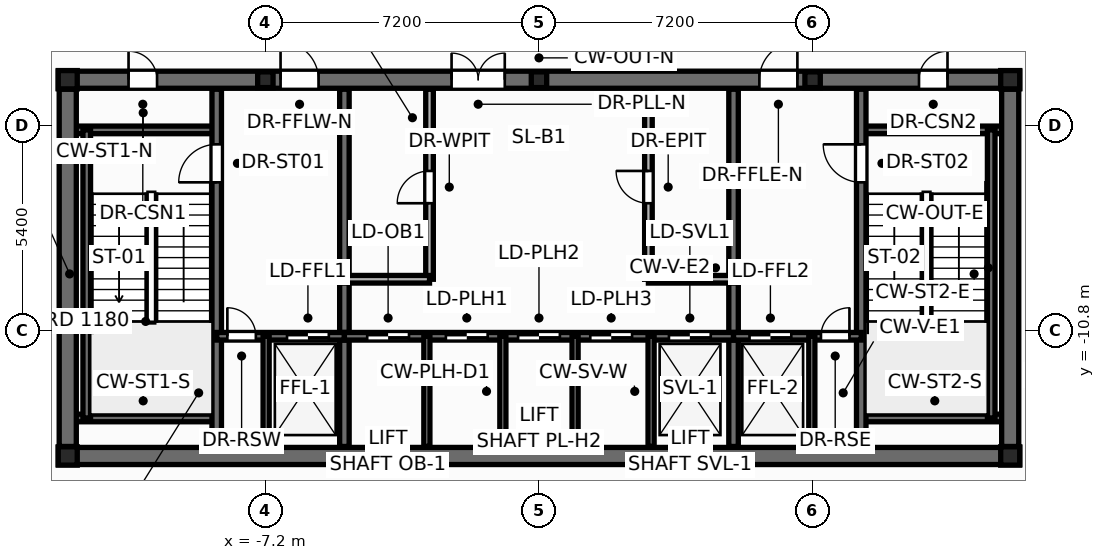
"""IFC4 building model, lengths in metres.
Left out: names, types, materials, properties, quantities, classifications, styles, units other than length and angle.
Written with IfcOpenShell. Run it as: python <this file> out.ifc"""

import sys

from ifc_helpers import new_model, si_unit, direction, frame, frame_2d, origin, origin_2d, place, context, subcontext, project, spatial, rectangle, i_section, extrude, element, fill, save


model = new_model("IFC4")
c1 = context("Model", 3, precision=1e-05, world=origin(), true_north=direction((0.0, 1.0)))
c2 = subcontext(c1, "Body", "Model", "MODEL_VIEW")
j1 = project(units=[si_unit("LENGTHUNIT", "METRE"), si_unit("PLANEANGLEUNIT", "RADIAN")], contexts=[c1])
p1 = place(None, origin())
s1 = spatial("IfcSite", under=j1, at=p1, CompositionType="ELEMENT")
p2 = place(p1, origin())
s2 = spatial("IfcBuilding", under=s1, at=p2, CompositionType="ELEMENT")
p3 = place(p2, frame((0.0, 0.0, -4.8)))
s3 = spatial("IfcBuildingStorey", under=s2, at=p3, CompositionType="ELEMENT", Elevation=-4.8)
for number, where, z_axis, x_axis in (
    (1, (-12.4, -14.1, 0.0), (0.0, 0.0, 1.0), (1.0, 0.0, 0.0)),
    (2, (12.4, -14.1, 0.0), (0.0, 0.0, 1.0), (1.0, 0.0, 0.0)),
    (3, (12.4, -4.2, 0.0), (0.0, 0.0, 1.0), (1.0, 0.0, 0.0)),
    (4, (-12.4, -4.2, 0.0), (0.0, 0.0, 1.0), (1.0, 0.0, 0.0)),
):
    element("IfcColumn", number, at=place(p3, frame(where, z_axis=z_axis, x_axis=x_axis)), inside=s3, PredefinedType="COLUMN", context=c2, shape_type="SweptSolid", body=[
        extrude(i_section(OverallWidth=0.5, OverallDepth=0.482, WebThickness=0.04, FlangeThickness=0.045, at=origin_2d()), origin(), (0.0, 0.0, 1.0), 4.8),
    ])
for number, where, z_axis, x_axis in (
    (5, (-7.2, -4.2, 0.0), (0.0, 0.0, 1.0), (1.0, 0.0, 0.0)),
    (6, (0.0, -4.2, 0.0), (0.0, 0.0, 1.0), (1.0, 0.0, 0.0)),
    (7, (7.2, -4.2, 0.0), (0.0, 0.0, 1.0), (1.0, 0.0, 0.0)),
):
    element("IfcColumn", number, at=place(p3, frame(where, z_axis=z_axis, x_axis=x_axis)), inside=s3, PredefinedType="PILASTER", context=c2, shape_type="SweptSolid", body=[
        extrude(i_section(OverallWidth=0.405, OverallDepth=0.414, WebThickness=0.022, FlangeThickness=0.032, at=origin_2d()), origin(), (0.0, 0.0, 1.0), 4.8),
    ])
p4 = place(p3, frame((-12.65, -14.1, 0.0), z_axis=(0.0, 0.0, 1.0), x_axis=(1.0, 0.0, 0.0)))
e8 = element("IfcWall", 8, at=p4, inside=s3, PredefinedType="SHEAR", context=c2, shape_type="SweptSolid", body=[
    extrude(rectangle(XDim=25.3, YDim=0.45, at=frame_2d((12.65, 0.0))), origin(), (0.0, 0.0, 1.0), 4.8),
])
p5 = place(p3, frame((-12.65, -4.2, 0.0), z_axis=(0.0, 0.0, 1.0), x_axis=(1.0, 0.0, 0.0)))
e9 = element("IfcWall", 9, at=p5, inside=s3, PredefinedType="SHEAR", context=c2, shape_type="SweptSolid", body=[
    extrude(rectangle(XDim=25.3, YDim=0.45, at=frame_2d((12.65, 0.0))), origin(), (0.0, 0.0, 1.0), 4.8),
])
p6 = place(p5, frame((1.85, 0.0, 0.0)))
e10 = element("IfcOpeningElement", 10, at=p6, cuts=e9, PredefinedType="OPENING", context=c2, shape_type="SweptSolid", body=[
    extrude(rectangle(XDim=0.756, YDim=2.054, at=frame_2d((0.375, 1.027))), frame((0.0, 0.235, 0.0), z_axis=(0.0, -1.0, 0.0), x_axis=(1.0, 0.0, 0.0)), (0.0, 0.0, 1.0), 0.47),
])
p7 = place(p5, frame((22.65, 0.0, 0.0)))
e11 = element("IfcOpeningElement", 11, at=p7, cuts=e9, PredefinedType="OPENING", context=c2, shape_type="SweptSolid", body=[
    extrude(rectangle(XDim=0.756, YDim=2.054, at=frame_2d((0.375, 1.027))), frame((0.0, 0.235, 0.0), z_axis=(0.0, -1.0, 0.0), x_axis=(1.0, 0.0, 0.0)), (0.0, 0.0, 1.0), 0.47),
])
p8 = place(p5, frame((5.85, 0.0, 0.0)))
e12 = element("IfcOpeningElement", 12, at=p8, cuts=e9, PredefinedType="OPENING", context=c2, shape_type="SweptSolid", body=[
    extrude(rectangle(XDim=1.006, YDim=2.104, at=frame_2d((0.5, 1.052))), frame((0.0, 0.235, 0.0), z_axis=(0.0, -1.0, 0.0), x_axis=(1.0, 0.0, 0.0)), (0.0, 0.0, 1.0), 0.47),
])
p9 = place(p5, frame((10.35, 0.0, 0.0)))
e13 = element("IfcOpeningElement", 13, at=p9, cuts=e9, PredefinedType="OPENING", context=c2, shape_type="SweptSolid", body=[
    extrude(rectangle(XDim=1.406, YDim=2.154, at=frame_2d((0.7, 1.077))), frame((0.0, 0.235, 0.0), z_axis=(0.0, -1.0, 0.0), x_axis=(1.0, 0.0, 0.0)), (0.0, 0.0, 1.0), 0.47),
])
p10 = place(p5, frame((18.45, 0.0, 0.0)))
e14 = element("IfcOpeningElement", 14, at=p10, cuts=e9, PredefinedType="OPENING", context=c2, shape_type="SweptSolid", body=[
    extrude(rectangle(XDim=1.006, YDim=2.104, at=frame_2d((0.5, 1.052))), frame((0.0, 0.235, 0.0), z_axis=(0.0, -1.0, 0.0), x_axis=(1.0, 0.0, 0.0)), (0.0, 0.0, 1.0), 0.47),
])
for number, where, z_axis, x_axis in (
    (15, (-12.35, -5.52, 0.0), (0.0, 0.0, 1.0), (1.0, 0.0, 0.0)),
    (16, (-12.35, -13.1, 0.0), (0.0, 0.0, 1.0), (1.0, 0.0, 0.0)),
):
    element("IfcWall", number, at=place(p3, frame(where, z_axis=z_axis, x_axis=x_axis)), inside=s3, PredefinedType="SOLIDWALL", context=c2, shape_type="SweptSolid", body=[
        extrude(rectangle(XDim=3.87, YDim=0.2, at=frame_2d((1.935, 0.0))), origin(), (0.0, 0.0, 1.0), 4.8),
    ])
p11 = place(p3, frame((-11.9, -13.1, 0.0), z_axis=(0.0, 0.0, 1.0), x_axis=(0.0, 1.0, 0.0)))
e17 = element("IfcWall", 17, at=p11, inside=s3, PredefinedType="SOLIDWALL", context=c2, shape_type="SweptSolid", body=[
    extrude(rectangle(XDim=7.58, YDim=0.2, at=frame_2d((3.79, 0.0))), origin(), (0.0, 0.0, 1.0), 4.8),
])
for number, where, z_axis, x_axis in (
    (18, (8.48, -5.52, 0.0), (0.0, 0.0, 1.0), (1.0, 0.0, 0.0)),
    (19, (8.48, -13.1, 0.0), (0.0, 0.0, 1.0), (1.0, 0.0, 0.0)),
):
    element("IfcWall", number, at=place(p3, frame(where, z_axis=z_axis, x_axis=x_axis)), inside=s3, PredefinedType="SOLIDWALL", context=c2, shape_type="SweptSolid", body=[
        extrude(rectangle(XDim=3.87, YDim=0.2, at=frame_2d((1.935, 0.0))), origin(), (0.0, 0.0, 1.0), 4.8),
    ])
p12 = place(p3, frame((11.9, -13.1, 0.0), z_axis=(0.0, 0.0, 1.0), x_axis=(0.0, 1.0, 0.0)))
e20 = element("IfcWall", 20, at=p12, inside=s3, PredefinedType="SOLIDWALL", context=c2, shape_type="SweptSolid", body=[
    extrude(rectangle(XDim=7.58, YDim=0.2, at=frame_2d((3.79, 0.0))), origin(), (0.0, 0.0, 1.0), 4.8),
])
p13 = place(p3, frame((-8.48, -13.85, 0.0), z_axis=(0.0, 0.0, 1.0), x_axis=(0.0, 1.0, 0.0)))
e21 = element("IfcWall", 21, at=p13, inside=s3, PredefinedType="SHEAR", context=c2, shape_type="SweptSolid", body=[
    extrude(rectangle(XDim=9.4, YDim=0.25, at=frame_2d((4.7, 0.0))), origin(), (0.0, 0.0, 1.0), 4.8),
])
p14 = place(p13, frame((6.95, 0.0, 0.0)))
e22 = element("IfcOpeningElement", 22, at=p14, cuts=e21, PredefinedType="OPENING", context=c2, shape_type="SweptSolid", body=[
    extrude(rectangle(XDim=1.006, YDim=2.104, at=frame_2d((0.5, 1.052))), frame((0.0, 0.135, 0.0), z_axis=(0.0, -1.0, 0.0), x_axis=(1.0, 0.0, 0.0)), (0.0, 0.0, 1.0), 0.27),
])
p15 = place(p3, frame((8.48, -13.85, 0.0), z_axis=(0.0, 0.0, 1.0), x_axis=(0.0, 1.0, 0.0)))
e23 = element("IfcWall", 23, at=p15, inside=s3, PredefinedType="SHEAR", context=c2, shape_type="SweptSolid", body=[
    extrude(rectangle(XDim=9.4, YDim=0.25, at=frame_2d((4.7, 0.0))), origin(), (0.0, 0.0, 1.0), 4.8),
])
p16 = place(p15, frame((6.95, 0.0, 0.0)))
e24 = element("IfcOpeningElement", 24, at=p16, cuts=e23, PredefinedType="OPENING", context=c2, shape_type="SweptSolid", body=[
    extrude(rectangle(XDim=1.006, YDim=2.104, at=frame_2d((0.5, 1.052))), frame((0.0, 0.135, 0.0), z_axis=(0.0, -1.0, 0.0), x_axis=(1.0, 0.0, 0.0)), (0.0, 0.0, 1.0), 0.27),
])
for number, where, z_axis, x_axis in (
    (25, (-5.12, -13.85, 0.0), (0.0, 0.0, 1.0), (0.0, 1.0, 0.0)),
    (26, (5.12, -13.85, 0.0), (0.0, 0.0, 1.0), (0.0, 1.0, 0.0)),
):
    element("IfcWall", number, at=place(p3, frame(where, z_axis=z_axis, x_axis=x_axis)), inside=s3, PredefinedType="SHEAR", context=c2, shape_type="SweptSolid", body=[
        extrude(rectangle(XDim=9.4, YDim=0.25, at=frame_2d((4.7, 0.0))), origin(), (0.0, 0.0, 1.0), 4.8),
    ])
p17 = place(p3, frame((-8.48, -10.95, 0.0), z_axis=(0.0, 0.0, 1.0), x_axis=(1.0, 0.0, 0.0)))
e27 = element("IfcWall", 27, at=p17, inside=s3, PredefinedType="SOLIDWALL", context=c2, shape_type="SweptSolid", body=[
    extrude(rectangle(XDim=3.36, YDim=0.2, at=frame_2d((1.68, 0.0))), origin(), (0.0, 0.0, 1.0), 4.8),
])
p18 = place(p17, frame((0.28, 0.0, 0.0)))
e28 = element("IfcOpeningElement", 28, at=p18, cuts=e27, PredefinedType="OPENING", context=c2, shape_type="SweptSolid", body=[
    extrude(rectangle(XDim=0.756, YDim=2.054, at=frame_2d((0.375, 1.027))), frame((0.0, 0.11, 0.0), z_axis=(0.0, -1.0, 0.0), x_axis=(1.0, 0.0, 0.0)), (0.0, 0.0, 1.0), 0.22),
])
p19 = place(p17, frame((1.85, 0.0, 0.0)))
e29 = element("IfcOpeningElement", 29, at=p19, cuts=e27, PredefinedType="OPENING", context=c2, shape_type="SweptSolid", body=[
    extrude(rectangle(XDim=1.106, YDim=2.104, at=frame_2d((0.55, 1.052))), frame((0.0, 0.11, 0.0), z_axis=(0.0, -1.0, 0.0), x_axis=(1.0, 0.0, 0.0)), (0.0, 0.0, 1.0), 0.22),
])
p20 = place(p3, frame((-5.12, -10.95, 0.0), z_axis=(0.0, 0.0, 1.0), x_axis=(1.0, 0.0, 0.0)))
e30 = element("IfcWall", 30, at=p20, inside=s3, PredefinedType="SOLIDWALL", context=c2, shape_type="SweptSolid", body=[
    extrude(rectangle(XDim=10.24, YDim=0.2, at=frame_2d((5.12, 0.0))), origin(), (0.0, 0.0, 1.0), 4.8),
])
p21 = place(p20, frame((0.6, 0.0, 0.0)))
e31 = element("IfcOpeningElement", 31, at=p21, cuts=e30, PredefinedType="OPENING", context=c2, shape_type="SweptSolid", body=[
    extrude(rectangle(XDim=1.106, YDim=2.104, at=frame_2d((0.55, 1.052))), frame((0.0, 0.11, 0.0), z_axis=(0.0, -1.0, 0.0), x_axis=(1.0, 0.0, 0.0)), (0.0, 0.0, 1.0), 0.22),
])
p22 = place(p20, frame((2.67, 0.0, 0.0)))
e32 = element("IfcOpeningElement", 32, at=p22, cuts=e30, PredefinedType="OPENING", context=c2, shape_type="SweptSolid", body=[
    extrude(rectangle(XDim=1.106, YDim=2.104, at=frame_2d((0.55, 1.052))), frame((0.0, 0.11, 0.0), z_axis=(0.0, -1.0, 0.0), x_axis=(1.0, 0.0, 0.0)), (0.0, 0.0, 1.0), 0.22),
])
p23 = place(p20, frame((4.57, 0.0, 0.0)))
e33 = element("IfcOpeningElement", 33, at=p23, cuts=e30, PredefinedType="OPENING", context=c2, shape_type="SweptSolid", body=[
    extrude(rectangle(XDim=1.106, YDim=2.104, at=frame_2d((0.55, 1.052))), frame((0.0, 0.11, 0.0), z_axis=(0.0, -1.0, 0.0), x_axis=(1.0, 0.0, 0.0)), (0.0, 0.0, 1.0), 0.22),
])
p24 = place(p20, frame((6.47, 0.0, 0.0)))
e34 = element("IfcOpeningElement", 34, at=p24, cuts=e30, PredefinedType="OPENING", context=c2, shape_type="SweptSolid", body=[
    extrude(rectangle(XDim=1.106, YDim=2.104, at=frame_2d((0.55, 1.052))), frame((0.0, 0.11, 0.0), z_axis=(0.0, -1.0, 0.0), x_axis=(1.0, 0.0, 0.0)), (0.0, 0.0, 1.0), 0.22),
])
p25 = place(p20, frame((8.54, 0.0, 0.0)))
e35 = element("IfcOpeningElement", 35, at=p25, cuts=e30, PredefinedType="OPENING", context=c2, shape_type="SweptSolid", body=[
    extrude(rectangle(XDim=1.106, YDim=2.104, at=frame_2d((0.55, 1.052))), frame((0.0, 0.11, 0.0), z_axis=(0.0, -1.0, 0.0), x_axis=(1.0, 0.0, 0.0)), (0.0, 0.0, 1.0), 0.22),
])
p26 = place(p3, frame((5.12, -10.95, 0.0), z_axis=(0.0, 0.0, 1.0), x_axis=(1.0, 0.0, 0.0)))
e36 = element("IfcWall", 36, at=p26, inside=s3, PredefinedType="SOLIDWALL", context=c2, shape_type="SweptSolid", body=[
    extrude(rectangle(XDim=3.36, YDim=0.2, at=frame_2d((1.68, 0.0))), origin(), (0.0, 0.0, 1.0), 4.8),
])
p27 = place(p26, frame((0.42, 0.0, 0.0)))
e37 = element("IfcOpeningElement", 37, at=p27, cuts=e36, PredefinedType="OPENING", context=c2, shape_type="SweptSolid", body=[
    extrude(rectangle(XDim=1.106, YDim=2.104, at=frame_2d((0.55, 1.052))), frame((0.0, 0.11, 0.0), z_axis=(0.0, -1.0, 0.0), x_axis=(1.0, 0.0, 0.0)), (0.0, 0.0, 1.0), 0.22),
])
p28 = place(p26, frame((2.3, 0.0, 0.0)))
e38 = element("IfcOpeningElement", 38, at=p28, cuts=e36, PredefinedType="OPENING", context=c2, shape_type="SweptSolid", body=[
    extrude(rectangle(XDim=0.756, YDim=2.054, at=frame_2d((0.375, 1.027))), frame((0.0, 0.11, 0.0), z_axis=(0.0, -1.0, 0.0), x_axis=(1.0, 0.0, 0.0)), (0.0, 0.0, 1.0), 0.22),
])
for number, where, z_axis, x_axis in (
    (39, (-7.18, -13.85, 0.0), (0.0, 0.0, 1.0), (0.0, 1.0, 0.0)),
    (40, (7.18, -13.85, 0.0), (0.0, 0.0, 1.0), (0.0, 1.0, 0.0)),
    (41, (-2.95, -13.85, 0.0), (0.0, 0.0, 1.0), (0.0, 1.0, 0.0)),
    (42, (2.95, -13.85, 0.0), (0.0, 0.0, 1.0), (0.0, 1.0, 0.0)),
):
    element("IfcWall", number, at=place(p3, frame(where, z_axis=z_axis, x_axis=x_axis)), inside=s3, PredefinedType="PARTITIONING", context=c2, shape_type="SweptSolid", body=[
        extrude(rectangle(XDim=2.9, YDim=0.16, at=frame_2d((1.45, 0.0))), origin(), (0.0, 0.0, 1.0), 3.505),
    ])
for number, where, z_axis, x_axis in (
    (43, (-12.4, -13.85, 0.0), (0.0, 0.0, 1.0), (0.0, 1.0, 0.0)),
    (44, (12.4, -13.85, 0.0), (0.0, 0.0, 1.0), (0.0, 1.0, 0.0)),
):
    element("IfcWall", number, at=place(p3, frame(where, z_axis=z_axis, x_axis=x_axis)), inside=s3, PredefinedType="SHEAR", context=c2, shape_type="SweptSolid", body=[
        extrude(rectangle(XDim=9.4, YDim=0.45, at=frame_2d((4.7, 0.0))), origin(), (0.0, 0.0, 1.0), 4.8),
    ])
p29 = place(p3, frame((-2.88, -9.45, 0.0), z_axis=(0.0, 0.0, 1.0), x_axis=(0.0, 1.0, 0.0)))
e45 = element("IfcWall", 45, at=p29, inside=s3, PredefinedType="SOLIDWALL", context=c2, shape_type="SweptSolid", body=[
    extrude(rectangle(XDim=5.0, YDim=0.2, at=frame_2d((2.5, 0.0))), origin(), (0.0, 0.0, 1.0), 4.48),
])
p30 = place(p29, frame((2.0, 0.0, 0.0)))
e46 = element("IfcOpeningElement", 46, at=p30, cuts=e45, PredefinedType="OPENING", context=c2, shape_type="SweptSolid", body=[
    extrude(rectangle(XDim=0.856, YDim=2.054, at=frame_2d((0.425, 1.027))), frame((0.0, 0.11, 0.0), z_axis=(0.0, -1.0, 0.0), x_axis=(1.0, 0.0, 0.0)), (0.0, 0.0, 1.0), 0.22),
])
p31 = place(p3, frame((-5.12, -9.45, 0.0), z_axis=(0.0, 0.0, 1.0), x_axis=(1.0, 0.0, 0.0)))
e47 = element("IfcWall", 47, at=p31, inside=s3, PredefinedType="SOLIDWALL", context=c2, shape_type="SweptSolid", body=[
    extrude(rectangle(XDim=2.24, YDim=0.2, at=frame_2d((1.12, 0.0))), origin(), (0.0, 0.0, 1.0), 4.48),
])
p32 = place(p3, frame((2.88, -9.45, 0.0), z_axis=(0.0, 0.0, 1.0), x_axis=(0.0, 1.0, 0.0)))
e48 = element("IfcWall", 48, at=p32, inside=s3, PredefinedType="SOLIDWALL", context=c2, shape_type="SweptSolid", body=[
    extrude(rectangle(XDim=5.0, YDim=0.2, at=frame_2d((2.5, 0.0))), origin(), (0.0, 0.0, 1.0), 4.48),
])
p33 = place(p32, frame((2.0, 0.0, 0.0)))
e49 = element("IfcOpeningElement", 49, at=p33, cuts=e48, PredefinedType="OPENING", context=c2, shape_type="SweptSolid", body=[
    extrude(rectangle(XDim=0.856, YDim=2.054, at=frame_2d((0.425, 1.027))), frame((0.0, 0.11, 0.0), z_axis=(0.0, -1.0, 0.0), x_axis=(1.0, 0.0, 0.0)), (0.0, 0.0, 1.0), 0.22),
])
p34 = place(p3, frame((2.88, -9.45, 0.0), z_axis=(0.0, 0.0, 1.0), x_axis=(1.0, 0.0, 0.0)))
e50 = element("IfcWall", 50, at=p34, inside=s3, PredefinedType="SOLIDWALL", context=c2, shape_type="SweptSolid", body=[
    extrude(rectangle(XDim=2.24, YDim=0.2, at=frame_2d((1.12, 0.0))), origin(), (0.0, 0.0, 1.0), 4.48),
])
for number, where, z_axis, x_axis in (
    (51, (-0.95, -13.85, 0.0), (0.0, 0.0, 1.0), (0.0, 1.0, 0.0)),
    (52, (0.95, -13.85, 0.0), (0.0, 0.0, 1.0), (0.0, 1.0, 0.0)),
):
    element("IfcWall", number, at=place(p3, frame(where, z_axis=z_axis, x_axis=x_axis)), inside=s3, PredefinedType="PARTITIONING", context=c2, shape_type="SweptSolid", body=[
        extrude(rectangle(XDim=2.9, YDim=0.16, at=frame_2d((1.45, 0.0))), origin(), (0.0, 0.0, 1.0), 3.505),
    ])
p35 = place(p30, origin())
e53 = element("IfcDoor", 53, at=p35, inside=s3, OperationType="SINGLE_SWING_LEFT", PredefinedType="DOOR", context=c2, shape_type="SweptSolid", body=[
    extrude(rectangle(XDim=0.85, YDim=2.05, at=frame_2d((0.425, 1.025))), frame((0.0, 0.025, 0.0), z_axis=(0.0, -1.0, 0.0), x_axis=(1.0, 0.0, 0.0)), (0.0, 0.0, 1.0), 0.05),
])
fill(e46, e53)
p36 = place(p33, origin())
e54 = element("IfcDoor", 54, at=p36, inside=s3, OperationType="SINGLE_SWING_RIGHT", PredefinedType="DOOR", context=c2, shape_type="SweptSolid", body=[
    extrude(rectangle(XDim=0.85, YDim=2.05, at=frame_2d((0.425, 1.025))), frame((0.0, 0.025, 0.0), z_axis=(0.0, -1.0, 0.0), x_axis=(1.0, 0.0, 0.0)), (0.0, 0.0, 1.0), 0.05),
])
fill(e49, e54)
p37 = place(p14, origin())
e55 = element("IfcDoor", 55, at=p37, inside=s3, OperationType="SINGLE_SWING_LEFT", PredefinedType="DOOR", context=c2, shape_type="SweptSolid", body=[
    extrude(rectangle(XDim=1.0, YDim=2.1, at=frame_2d((0.5, 1.05))), frame((0.0, 0.025, 0.0), z_axis=(0.0, -1.0, 0.0), x_axis=(1.0, 0.0, 0.0)), (0.0, 0.0, 1.0), 0.05),
])
fill(e22, e55)
p38 = place(p16, origin())
e56 = element("IfcDoor", 56, at=p38, inside=s3, OperationType="SINGLE_SWING_RIGHT", PredefinedType="DOOR", context=c2, shape_type="SweptSolid", body=[
    extrude(rectangle(XDim=1.0, YDim=2.1, at=frame_2d((0.5, 1.05))), frame((0.0, 0.025, 0.0), z_axis=(0.0, -1.0, 0.0), x_axis=(1.0, 0.0, 0.0)), (0.0, 0.0, 1.0), 0.05),
])
fill(e24, e56)
p39 = place(p18, origin())
e57 = element("IfcDoor", 57, at=p39, inside=s3, OperationType="SINGLE_SWING_LEFT", PredefinedType="DOOR", context=c2, shape_type="SweptSolid", body=[
    extrude(rectangle(XDim=0.75, YDim=2.05, at=frame_2d((0.375, 1.025))), frame((0.0, 0.025, 0.0), z_axis=(0.0, -1.0, 0.0), x_axis=(1.0, 0.0, 0.0)), (0.0, 0.0, 1.0), 0.05),
])
fill(e28, e57)
p40 = place(p19, origin())
e58 = element("IfcDoor", 58, at=p40, inside=s3, OperationType="DOUBLE_DOOR_SLIDING", PredefinedType="DOOR", context=c2, shape_type="SweptSolid", body=[
    extrude(rectangle(XDim=1.1, YDim=2.1, at=frame_2d((0.55, 1.05))), frame((0.0, 0.025, 0.0), z_axis=(0.0, -1.0, 0.0), x_axis=(1.0, 0.0, 0.0)), (0.0, 0.0, 1.0), 0.05),
])
fill(e29, e58)
p41 = place(p27, origin())
e59 = element("IfcDoor", 59, at=p41, inside=s3, OperationType="DOUBLE_DOOR_SLIDING", PredefinedType="DOOR", context=c2, shape_type="SweptSolid", body=[
    extrude(rectangle(XDim=1.1, YDim=2.1, at=frame_2d((0.55, 1.05))), frame((0.0, 0.025, 0.0), z_axis=(0.0, -1.0, 0.0), x_axis=(1.0, 0.0, 0.0)), (0.0, 0.0, 1.0), 0.05),
])
fill(e37, e59)
p42 = place(p28, origin())
e60 = element("IfcDoor", 60, at=p42, inside=s3, OperationType="SINGLE_SWING_RIGHT", PredefinedType="DOOR", context=c2, shape_type="SweptSolid", body=[
    extrude(rectangle(XDim=0.75, YDim=2.05, at=frame_2d((0.375, 1.025))), frame((0.0, 0.025, 0.0), z_axis=(0.0, -1.0, 0.0), x_axis=(1.0, 0.0, 0.0)), (0.0, 0.0, 1.0), 0.05),
])
fill(e38, e60)
p43 = place(p21, origin())
e61 = element("IfcDoor", 61, at=p43, inside=s3, OperationType="DOUBLE_DOOR_SLIDING", PredefinedType="DOOR", context=c2, shape_type="SweptSolid", body=[
    extrude(rectangle(XDim=1.1, YDim=2.1, at=frame_2d((0.55, 1.05))), frame((0.0, 0.025, 0.0), z_axis=(0.0, -1.0, 0.0), x_axis=(1.0, 0.0, 0.0)), (0.0, 0.0, 1.0), 0.05),
])
fill(e31, e61)
p44 = place(p22, origin())
e62 = element("IfcDoor", 62, at=p44, inside=s3, OperationType="DOUBLE_DOOR_SLIDING", PredefinedType="DOOR", context=c2, shape_type="SweptSolid", body=[
    extrude(rectangle(XDim=1.1, YDim=2.1, at=frame_2d((0.55, 1.05))), frame((0.0, 0.025, 0.0), z_axis=(0.0, -1.0, 0.0), x_axis=(1.0, 0.0, 0.0)), (0.0, 0.0, 1.0), 0.05),
])
fill(e32, e62)
p45 = place(p23, origin())
e63 = element("IfcDoor", 63, at=p45, inside=s3, OperationType="DOUBLE_DOOR_SLIDING", PredefinedType="DOOR", context=c2, shape_type="SweptSolid", body=[
    extrude(rectangle(XDim=1.1, YDim=2.1, at=frame_2d((0.55, 1.05))), frame((0.0, 0.025, 0.0), z_axis=(0.0, -1.0, 0.0), x_axis=(1.0, 0.0, 0.0)), (0.0, 0.0, 1.0), 0.05),
])
fill(e33, e63)
p46 = place(p24, origin())
e64 = element("IfcDoor", 64, at=p46, inside=s3, OperationType="DOUBLE_DOOR_SLIDING", PredefinedType="DOOR", context=c2, shape_type="SweptSolid", body=[
    extrude(rectangle(XDim=1.1, YDim=2.1, at=frame_2d((0.55, 1.05))), frame((0.0, 0.025, 0.0), z_axis=(0.0, -1.0, 0.0), x_axis=(1.0, 0.0, 0.0)), (0.0, 0.0, 1.0), 0.05),
])
fill(e34, e64)
p47 = place(p25, origin())
e65 = element("IfcDoor", 65, at=p47, inside=s3, OperationType="DOUBLE_DOOR_SLIDING", PredefinedType="DOOR", context=c2, shape_type="SweptSolid", body=[
    extrude(rectangle(XDim=1.1, YDim=2.1, at=frame_2d((0.55, 1.05))), frame((0.0, 0.025, 0.0), z_axis=(0.0, -1.0, 0.0), x_axis=(1.0, 0.0, 0.0)), (0.0, 0.0, 1.0), 0.05),
])
fill(e35, e65)
p48 = place(p6, origin())
e66 = element("IfcDoor", 66, at=p48, inside=s3, OperationType="SINGLE_SWING_LEFT", PredefinedType="DOOR", context=c2, shape_type="SweptSolid", body=[
    extrude(rectangle(XDim=0.75, YDim=2.05, at=frame_2d((0.375, 1.025))), frame((0.0, 0.025, 0.0), z_axis=(0.0, -1.0, 0.0), x_axis=(1.0, 0.0, 0.0)), (0.0, 0.0, 1.0), 0.05),
])
fill(e10, e66)
p49 = place(p7, origin())
e67 = element("IfcDoor", 67, at=p49, inside=s3, OperationType="SINGLE_SWING_RIGHT", PredefinedType="DOOR", context=c2, shape_type="SweptSolid", body=[
    extrude(rectangle(XDim=0.75, YDim=2.05, at=frame_2d((0.375, 1.025))), frame((0.0, 0.025, 0.0), z_axis=(0.0, -1.0, 0.0), x_axis=(1.0, 0.0, 0.0)), (0.0, 0.0, 1.0), 0.05),
])
fill(e11, e67)
p50 = place(p8, origin())
e68 = element("IfcDoor", 68, at=p50, inside=s3, OperationType="SINGLE_SWING_LEFT", PredefinedType="DOOR", context=c2, shape_type="SweptSolid", body=[
    extrude(rectangle(XDim=1.0, YDim=2.1, at=frame_2d((0.5, 1.05))), frame((0.0, 0.025, 0.0), z_axis=(0.0, -1.0, 0.0), x_axis=(1.0, 0.0, 0.0)), (0.0, 0.0, 1.0), 0.05),
])
fill(e12, e68)
p51 = place(p9, origin())
e69 = element("IfcDoor", 69, at=p51, inside=s3, OperationType="DOUBLE_DOOR_SINGLE_SWING", PredefinedType="DOOR", context=c2, shape_type="SweptSolid", body=[
    extrude(rectangle(XDim=1.4, YDim=2.15, at=frame_2d((0.7, 1.075))), frame((0.0, 0.025, 0.0), z_axis=(0.0, -1.0, 0.0), x_axis=(1.0, 0.0, 0.0)), (0.0, 0.0, 1.0), 0.05),
])
fill(e13, e69)
p52 = place(p10, origin())
e70 = element("IfcDoor", 70, at=p52, inside=s3, OperationType="SINGLE_SWING_RIGHT", PredefinedType="DOOR", context=c2, shape_type="SweptSolid", body=[
    extrude(rectangle(XDim=1.0, YDim=2.1, at=frame_2d((0.5, 1.05))), frame((0.0, 0.025, 0.0), z_axis=(0.0, -1.0, 0.0), x_axis=(1.0, 0.0, 0.0)), (0.0, 0.0, 1.0), 0.05),
])
fill(e14, e70)
save(model, sys.argv[1])
